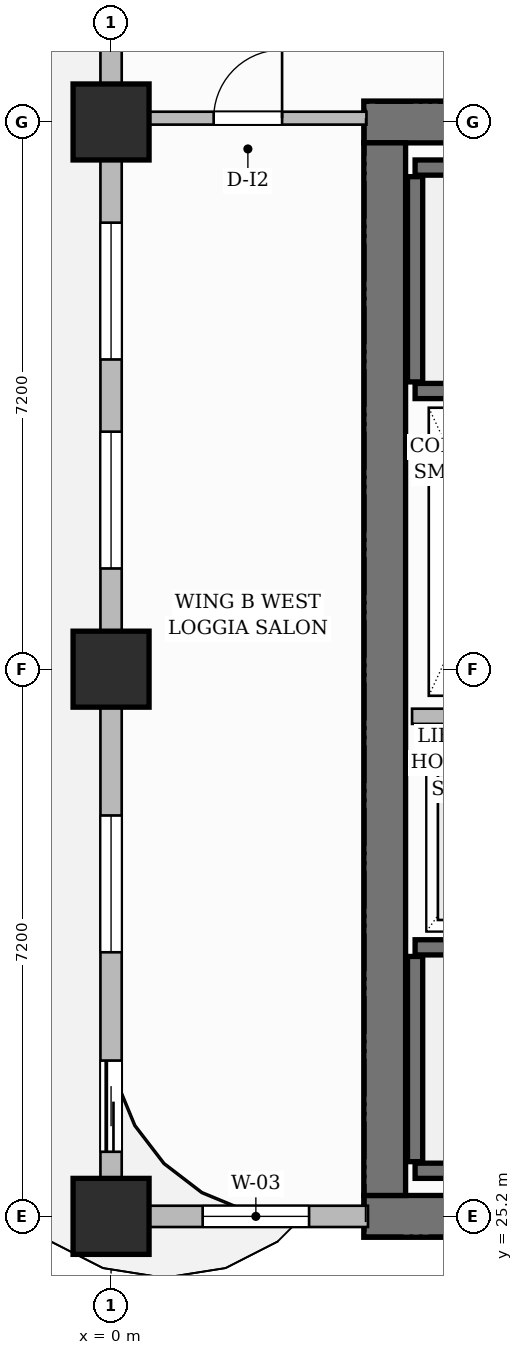
"""IFC4 building model, lengths in metres.
Left out: names, types, materials, properties, quantities, classifications, styles, units other than length and angle.
Written with IfcOpenShell. Run it as: python <this file> out.ifc"""

import sys

from ifc_helpers import new_model, si_unit, direction, frame, frame_2d, origin, origin_2d, place, context, subcontext, project, spatial, rectangle, extrude, source, transform, mapped, element, fill, save


model = new_model("IFC4")
c1 = context("Model", 3, precision=1e-05, world=origin(), true_north=direction((0.0, 1.0)))
c2 = subcontext(c1, "Body", "Model", "MODEL_VIEW")
j1 = project(units=[si_unit("LENGTHUNIT", "METRE"), si_unit("PLANEANGLEUNIT", "RADIAN")], contexts=[c1])
p1 = place(None, origin())
s1 = spatial("IfcSite", under=j1, at=p1, CompositionType="ELEMENT")
p2 = place(p1, origin())
s2 = spatial("IfcBuilding", under=s1, at=p2, CompositionType="ELEMENT")
p3 = place(p2, frame((0.0, 0.0, 141.4)))
s3 = spatial("IfcBuildingStorey", under=s2, at=p3, CompositionType="ELEMENT", Elevation=141.4)
for number, where, z_axis, x_axis in (
    (1, (3.325, 25.2, 0.0), (0.0, 0.0, 1.0), (1.0, 0.0, 0.0)),
    (2, (3.325, 39.6, 0.0), (0.0, 0.0, 1.0), (1.0, 0.0, 0.0)),
):
    element("IfcWall", number, at=place(p3, frame(where, z_axis=z_axis, x_axis=x_axis)), inside=s3, PredefinedType="SHEAR", context=c2, shape_type="SweptSolid", body=[
        extrude(rectangle(XDim=8.35, YDim=0.55, at=frame_2d((4.175, 0.0))), origin(), (0.0, 0.0, 1.0), 3.7),
    ])
p4 = place(p3, frame((3.6, 25.475, 0.0), z_axis=(0.0, 0.0, 1.0), x_axis=(0.0, 1.0, 0.0)))
e3 = element("IfcWall", 3, at=p4, inside=s3, PredefinedType="SHEAR", context=c2, shape_type="SweptSolid", body=[
    extrude(rectangle(XDim=13.85, YDim=0.55, at=frame_2d((6.925, 0.0))), origin(), (0.0, 0.0, 1.0), 3.7),
])
m1 = source(origin(), c2, "Body", "SweptSolid", [
    extrude(rectangle(XDim=1.0, YDim=1.0, at=origin_2d()), origin(), (0.0, 0.0, 1.0), 3.7),
])
for number, where, z_axis, x_axis in (
    (4, (0.0, 25.2, 0.0), (0.0, 0.0, 1.0), (1.0, 0.0, 0.0)),
    (5, (0.0, 32.4, 0.0), (0.0, 0.0, 1.0), (1.0, 0.0, 0.0)),
    (6, (0.0, 39.6, 0.0), (0.0, 0.0, 1.0), (1.0, 0.0, 0.0)),
):
    element("IfcColumn", number, at=place(p3, frame(where, z_axis=z_axis, x_axis=x_axis)), inside=s3, PredefinedType="COLUMN", context=c2, shape_type="MappedRepresentation", body=[
        mapped(m1, transform((0.0, 0.0, 0.0), scale=1.0)),
    ])
p5 = place(p3, frame((4.0, 25.8, 0.0), z_axis=(0.0, 0.0, 1.0), x_axis=(1.0, 0.0, 0.0)))
e7 = element("IfcWall", 7, at=p5, inside=s3, PredefinedType="SHEAR", context=c2, shape_type="SweptSolid", body=[
    extrude(rectangle(XDim=7.1, YDim=0.2, at=frame_2d((3.55, 0.0))), origin(), (0.0, 0.0, 1.0), 3.7),
])
p6 = place(p3, frame((4.0, 25.92, 0.0), z_axis=(0.0, 0.0, 1.0), x_axis=(0.0, 1.0, 0.0)))
e8 = element("IfcWall", 8, at=p6, inside=s3, PredefinedType="SHEAR", context=c2, shape_type="SweptSolid", body=[
    extrude(rectangle(XDim=2.7, YDim=0.2, at=frame_2d((1.35, 0.0))), origin(), (0.0, 0.0, 1.0), 3.7),
])
p7 = place(p3, frame((4.0, 28.74, 0.0), z_axis=(0.0, 0.0, 1.0), x_axis=(1.0, 0.0, 0.0)))
e9 = element("IfcWall", 9, at=p7, inside=s3, PredefinedType="SHEAR", context=c2, shape_type="SweptSolid", body=[
    extrude(rectangle(XDim=7.1, YDim=0.2, at=frame_2d((3.55, 0.0))), origin(), (0.0, 0.0, 1.0), 3.7),
])
p8 = place(p7, frame((5.815, 0.0, 0.0)))
e10 = element("IfcOpeningElement", 10, at=p8, cuts=e9, PredefinedType="OPENING", context=c2, shape_type="SweptSolid", body=[
    extrude(rectangle(XDim=1.05, YDim=2.2, at=frame_2d((0.525, 1.1))), frame((0.0, 0.11, 0.0), z_axis=(0.0, -1.0, 0.0), x_axis=(1.0, 0.0, 0.0)), (0.0, 0.0, 1.0), 0.22),
])
p9 = place(p3, frame((4.0, 39.0, 0.0), z_axis=(0.0, 0.0, 1.0), x_axis=(1.0, 0.0, 0.0)))
e11 = element("IfcWall", 11, at=p9, inside=s3, PredefinedType="SHEAR", context=c2, shape_type="SweptSolid", body=[
    extrude(rectangle(XDim=7.1, YDim=0.2, at=frame_2d((3.55, 0.0))), origin(), (0.0, 0.0, 1.0), 3.7),
])
p10 = place(p3, frame((4.0, 36.18, 0.0), z_axis=(0.0, 0.0, 1.0), x_axis=(0.0, 1.0, 0.0)))
e12 = element("IfcWall", 12, at=p10, inside=s3, PredefinedType="SHEAR", context=c2, shape_type="SweptSolid", body=[
    extrude(rectangle(XDim=2.7, YDim=0.2, at=frame_2d((1.35, 0.0))), origin(), (0.0, 0.0, 1.0), 3.7),
])
p11 = place(p3, frame((4.0, 36.06, 0.0), z_axis=(0.0, 0.0, 1.0), x_axis=(1.0, 0.0, 0.0)))
e13 = element("IfcWall", 13, at=p11, inside=s3, PredefinedType="SHEAR", context=c2, shape_type="SweptSolid", body=[
    extrude(rectangle(XDim=7.1, YDim=0.2, at=frame_2d((3.55, 0.0))), origin(), (0.0, 0.0, 1.0), 3.7),
])
p12 = place(p11, frame((5.815, 0.0, 0.0)))
e14 = element("IfcOpeningElement", 14, at=p12, cuts=e13, PredefinedType="OPENING", context=c2, shape_type="SweptSolid", body=[
    extrude(rectangle(XDim=1.05, YDim=2.2, at=frame_2d((0.525, 1.1))), frame((0.0, 0.11, 0.0), z_axis=(0.0, -1.0, 0.0), x_axis=(1.0, 0.0, 0.0)), (0.0, 0.0, 1.0), 0.22),
])
p13 = place(p3, frame((3.96, 31.78, 0.0), z_axis=(0.0, 0.0, 1.0), x_axis=(1.0, 0.0, 0.0)))
e15 = element("IfcWall", 15, at=p13, inside=s3, PredefinedType="PARTITIONING", context=c2, shape_type="SweptSolid", body=[
    extrude(rectangle(XDim=2.13, YDim=0.2, at=frame_2d((1.065, 0.0))), origin(), (0.0, 0.0, 1.0), 3.4),
])
p14 = place(p3, frame((0.24, 39.65, 0.0), z_axis=(0.0, 0.0, 1.0), x_axis=(1.0, 0.0, 0.0)))
e16 = element("IfcWall", 16, at=p14, inside=s3, PredefinedType="PARTITIONING", context=c2, shape_type="SweptSolid", body=[
    extrude(rectangle(XDim=3.12, YDim=0.17, at=frame_2d((1.56, 0.0))), origin(), (0.0, 0.0, 1.0), 3.4),
])
p15 = place(p14, frame((1.11, 0.0, 0.0)))
e17 = element("IfcOpeningElement", 17, at=p15, cuts=e16, PredefinedType="OPENING", context=c2, shape_type="SweptSolid", body=[
    extrude(rectangle(XDim=0.9, YDim=2.15, at=frame_2d((0.45, 1.075))), frame((0.0, 0.095, 0.0), z_axis=(0.0, -1.0, 0.0), x_axis=(1.0, 0.0, 0.0)), (0.0, 0.0, 1.0), 0.19),
])
p16 = place(p3, frame((0.0, 25.2, 0.0), z_axis=(0.0, 0.0, 1.0), x_axis=(1.0, 0.0, 0.0)))
e18 = element("IfcWall", 18, at=p16, inside=s3, PredefinedType="SOLIDWALL", context=c2, shape_type="SweptSolid", body=[
    extrude(rectangle(XDim=3.38, YDim=0.28, at=frame_2d((1.69, 0.0))), origin(), (0.0, 0.0, 1.0), 3.4),
])
p17 = place(p16, frame((1.205, 0.0, 0.8)))
e19 = element("IfcOpeningElement", 19, at=p17, cuts=e18, PredefinedType="OPENING", context=c2, shape_type="SweptSolid", body=[
    extrude(rectangle(XDim=1.4, YDim=1.85, at=frame_2d((0.7, 0.925))), frame((0.0, 0.15, 0.0), z_axis=(0.0, -1.0, 0.0), x_axis=(1.0, 0.0, 0.0)), (0.0, 0.0, 1.0), 0.3),
])
p18 = place(p3, frame((0.0, 25.25, 0.0), z_axis=(0.0, 0.0, 1.0), x_axis=(0.0, 1.0, 0.0)))
e20 = element("IfcWall", 20, at=p18, inside=s3, PredefinedType="SOLIDWALL", context=c2, shape_type="SweptSolid", body=[
    extrude(rectangle(XDim=21.5, YDim=0.28, at=frame_2d((10.75, 0.0))), origin(), (0.0, 0.0, 1.0), 2.885),
])
p19 = place(p18, frame((18.357, 0.0, 0.0)))
e21 = element("IfcOpeningElement", 21, at=p19, cuts=e20, PredefinedType="OPENING", context=c2, shape_type="SweptSolid", body=[
    extrude(rectangle(XDim=1.2, YDim=2.2, at=frame_2d((0.6, 1.1))), frame((0.0, 0.15, 0.0), z_axis=(0.0, -1.0, 0.0), x_axis=(1.0, 0.0, 0.0)), (0.0, 0.0, 1.0), 0.3),
])
p20 = place(p18, frame((0.8, 0.0, 0.0)))
e22 = element("IfcOpeningElement", 22, at=p20, cuts=e20, PredefinedType="OPENING", context=c2, shape_type="SweptSolid", body=[
    extrude(rectangle(XDim=1.2, YDim=2.2, at=frame_2d((0.6, 1.1))), frame((0.0, 0.15, 0.0), z_axis=(0.0, -1.0, 0.0), x_axis=(1.0, 0.0, 0.0)), (0.0, 0.0, 1.0), 0.3),
])
p21 = place(p18, frame((3.425, 0.0, 0.8)))
e23 = element("IfcOpeningElement", 23, at=p21, cuts=e20, PredefinedType="OPENING", context=c2, shape_type="SweptSolid", body=[
    extrude(rectangle(XDim=1.8, YDim=1.85, at=frame_2d((0.9, 0.925))), frame((0.0, 0.15, 0.0), z_axis=(0.0, -1.0, 0.0), x_axis=(1.0, 0.0, 0.0)), (0.0, 0.0, 1.0), 0.3),
])
p22 = place(p18, frame((8.475, 0.0, 0.8)))
e24 = element("IfcOpeningElement", 24, at=p22, cuts=e20, PredefinedType="OPENING", context=c2, shape_type="SweptSolid", body=[
    extrude(rectangle(XDim=1.8, YDim=1.85, at=frame_2d((0.9, 0.925))), frame((0.0, 0.15, 0.0), z_axis=(0.0, -1.0, 0.0), x_axis=(1.0, 0.0, 0.0)), (0.0, 0.0, 1.0), 0.3),
])
p23 = place(p18, frame((11.225, 0.0, 0.8)))
e25 = element("IfcOpeningElement", 25, at=p23, cuts=e20, PredefinedType="OPENING", context=c2, shape_type="SweptSolid", body=[
    extrude(rectangle(XDim=1.8, YDim=1.85, at=frame_2d((0.9, 0.925))), frame((0.0, 0.15, 0.0), z_axis=(0.0, -1.0, 0.0), x_axis=(1.0, 0.0, 0.0)), (0.0, 0.0, 1.0), 0.3),
])
p24 = place(p18, frame((16.632, 0.0, 0.8)))
e26 = element("IfcOpeningElement", 26, at=p24, cuts=e20, PredefinedType="OPENING", context=c2, shape_type="SweptSolid", body=[
    extrude(rectangle(XDim=1.15, YDim=1.8, at=frame_2d((0.575, 0.9))), frame((0.0, 0.15, 0.0), z_axis=(0.0, -1.0, 0.0), x_axis=(1.0, 0.0, 0.0)), (0.0, 0.0, 1.0), 0.3),
])
m2 = source(origin(), c2, "Body", "SweptSolid", [
    extrude(rectangle(XDim=0.9, YDim=2.15, at=frame_2d((0.45, 1.075))), frame((0.0, 0.025, 0.0), z_axis=(0.0, -1.0, 0.0), x_axis=(1.0, 0.0, 0.0)), (0.0, 0.0, 1.0), 0.05),
])
p25 = place(p15, origin())
e27 = element("IfcDoor", 27, at=p25, inside=s3, OperationType="SINGLE_SWING_RIGHT", PredefinedType="DOOR", context=c2, shape_type="MappedRepresentation", body=[
    mapped(m2, transform((0.0, 0.0, 0.0), scale=1.0)),
])
fill(e17, e27)
m3 = source(origin(), c2, "Body", "SweptSolid", [
    extrude(rectangle(XDim=1.2, YDim=2.2, at=frame_2d((0.6, 1.1))), frame((0.0, 0.025, 0.0), z_axis=(0.0, -1.0, 0.0), x_axis=(1.0, 0.0, 0.0)), (0.0, 0.0, 1.0), 0.05),
])
p26 = place(p20, origin())
e28 = element("IfcDoor", 28, at=p26, inside=s3, OperationType="SLIDING_TO_LEFT", PredefinedType="DOOR", context=c2, shape_type="MappedRepresentation", body=[
    mapped(m3, transform((0.0, 0.0, 0.0), scale=1.0)),
])
fill(e22, e28)
m4 = source(origin(), c2, "Body", "SweptSolid", [
    extrude(rectangle(XDim=1.4, YDim=1.85, at=frame_2d((0.7, 0.925))), frame((0.0, 0.03, 0.0), z_axis=(0.0, -1.0, 0.0), x_axis=(1.0, 0.0, 0.0)), (0.0, 0.0, 1.0), 0.06),
])
p27 = place(p17, origin())
e29 = element("IfcWindow", 29, at=p27, inside=s3, PartitioningType="SINGLE_PANEL", PredefinedType="WINDOW", context=c2, shape_type="MappedRepresentation", body=[
    mapped(m4, transform((0.0, 0.0, 0.0), scale=1.0)),
])
fill(e19, e29)
m5 = source(origin(), c2, "Body", "SweptSolid", [
    extrude(rectangle(XDim=1.8, YDim=1.85, at=frame_2d((0.9, 0.925))), frame((0.0, 0.03, 0.0), z_axis=(0.0, -1.0, 0.0), x_axis=(1.0, 0.0, 0.0)), (0.0, 0.0, 1.0), 0.06),
])
p28 = place(p21, origin())
e30 = element("IfcWindow", 30, at=p28, inside=s3, PartitioningType="DOUBLE_PANEL_VERTICAL", PredefinedType="WINDOW", context=c2, shape_type="MappedRepresentation", body=[
    mapped(m5, transform((0.0, 0.0, 0.0), scale=1.0)),
])
fill(e23, e30)
p29 = place(p22, origin())
e31 = element("IfcWindow", 31, at=p29, inside=s3, PartitioningType="DOUBLE_PANEL_VERTICAL", PredefinedType="WINDOW", context=c2, shape_type="MappedRepresentation", body=[
    mapped(m5, transform((0.0, 0.0, 0.0), scale=1.0)),
])
fill(e24, e31)
p30 = place(p23, origin())
e32 = element("IfcWindow", 32, at=p30, inside=s3, PartitioningType="DOUBLE_PANEL_VERTICAL", PredefinedType="WINDOW", context=c2, shape_type="MappedRepresentation", body=[
    mapped(m5, transform((0.0, 0.0, 0.0), scale=1.0)),
])
fill(e25, e32)
save(model, sys.argv[1])
